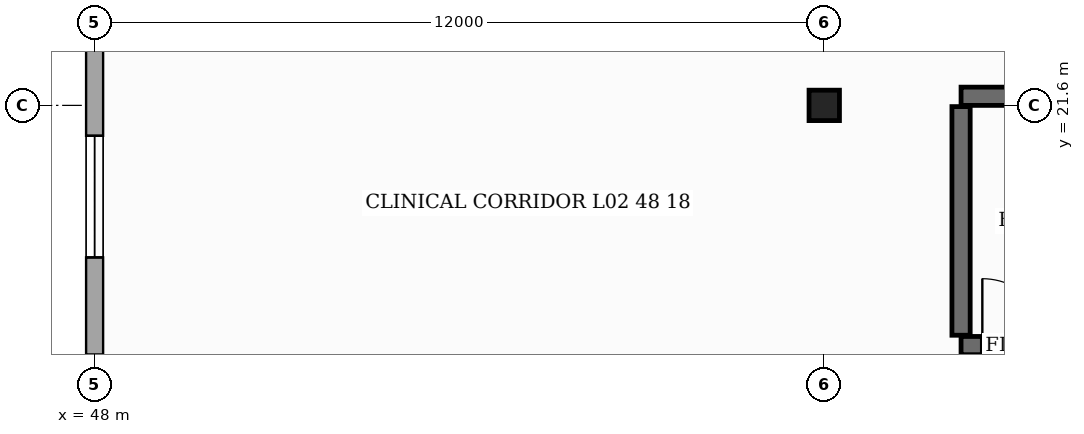
"""IFC4 building model, lengths in metres.
Left out: names, types, materials, properties, quantities, classifications, styles, units other than length and angle.
Written with IfcOpenShell. Run it as: python <this file> out.ifc"""

import sys

from ifc_helpers import new_model, si_unit, direction, frame, frame_2d, origin, origin_2d, place, context, subcontext, project, spatial, rectangle, extrude, element, fill, save


model = new_model("IFC4")
c1 = context("Model", 3, precision=1e-05, world=origin(), true_north=direction((0.0, 1.0)))
c2 = subcontext(c1, "Body", "Model", "MODEL_VIEW")
j1 = project(units=[si_unit("LENGTHUNIT", "METRE"), si_unit("PLANEANGLEUNIT", "RADIAN")], contexts=[c1])
p1 = place(None, origin())
s1 = spatial("IfcSite", under=j1, at=p1, CompositionType="ELEMENT")
p2 = place(p1, origin())
s2 = spatial("IfcBuilding", under=s1, at=p2, CompositionType="ELEMENT")
p3 = place(p2, frame((0.0, 0.0, 9.6)))
s3 = spatial("IfcBuildingStorey", under=s2, at=p3, CompositionType="ELEMENT", Elevation=9.6)
p4 = place(p3, frame((60.0, 21.6, 0.0), z_axis=(0.0, 0.0, 1.0), x_axis=(0.0, 1.0, 0.0)))
e1 = element("IfcColumn", 1, at=p4, inside=s3, PredefinedType="COLUMN", context=c2, shape_type="SweptSolid", body=[
    extrude(rectangle(XDim=0.5, YDim=0.5, at=origin_2d()), origin(), (0.0, 0.0, 1.0), 4.8),
])
p5 = place(p3, frame((62.25, 17.65, 0.0), z_axis=(0.0, 0.0, 1.0), x_axis=(1.0, 0.0, 0.0)))
e2 = element("IfcWall", 2, at=p5, inside=s3, PredefinedType="SHEAR", context=c2, shape_type="SweptSolid", body=[
    extrude(rectangle(XDim=8.7, YDim=0.3, at=frame_2d((4.35, 0.0))), origin(), (0.0, 0.0, 1.0), 4.8),
])
p6 = place(p5, frame((0.35, 0.0, 0.0)))
e3 = element("IfcOpeningElement", 3, at=p6, cuts=e2, PredefinedType="OPENING", context=c2, shape_type="SweptSolid", body=[
    extrude(rectangle(XDim=1.1, YDim=2.15, at=frame_2d((0.55, 1.075))), frame((0.0, 0.16, 0.0), z_axis=(0.0, -1.0, 0.0), x_axis=(1.0, 0.0, 0.0)), (0.0, 0.0, 1.0), 0.32),
])
p7 = place(p3, frame((70.95, 21.75, 0.0), z_axis=(0.0, 0.0, 1.0), x_axis=(-1.0, 0.0, 0.0)))
e4 = element("IfcWall", 4, at=p7, inside=s3, PredefinedType="SHEAR", context=c2, shape_type="SweptSolid", body=[
    extrude(rectangle(XDim=8.7, YDim=0.3, at=frame_2d((4.35, 0.0))), origin(), (0.0, 0.0, 1.0), 4.8),
])
p8 = place(p3, frame((62.25, 17.82, 0.0), z_axis=(0.0, 0.0, 1.0), x_axis=(0.0, 1.0, 0.0)))
e5 = element("IfcWall", 5, at=p8, inside=s3, PredefinedType="SHEAR", context=c2, shape_type="SweptSolid", body=[
    extrude(rectangle(XDim=3.76, YDim=0.3, at=frame_2d((1.88, 0.0))), origin(), (0.0, 0.0, 1.0), 4.8),
])
p9 = place(p3, frame((48.0, 0.0, 0.0), z_axis=(0.0, 0.0, 1.0), x_axis=(0.0, 1.0, 0.0)))
e6 = element("IfcWall", 6, at=p9, inside=s3, PredefinedType="STANDARD", context=c2, shape_type="SweptSolid", body=[
    extrude(rectangle(XDim=45.6, YDim=0.28, at=frame_2d((22.8, 0.0))), origin(), (0.0, 0.0, 1.0), 4.43),
])
p10 = place(p9, frame((1.1, 0.0, 1.05)))
e7 = element("IfcOpeningElement", 7, at=p10, cuts=e6, PredefinedType="OPENING", context=c2, shape_type="SweptSolid", body=[
    extrude(rectangle(XDim=2.0, YDim=2.1, at=frame_2d((1.0, 1.05))), frame((0.0, 0.15, 0.0), z_axis=(0.0, -1.0, 0.0), x_axis=(1.0, 0.0, 0.0)), (0.0, 0.0, 1.0), 0.3),
])
p11 = place(p9, frame((4.7, 0.0, 1.05)))
e8 = element("IfcOpeningElement", 8, at=p11, cuts=e6, PredefinedType="OPENING", context=c2, shape_type="SweptSolid", body=[
    extrude(rectangle(XDim=2.0, YDim=2.1, at=frame_2d((1.0, 1.05))), frame((0.0, 0.15, 0.0), z_axis=(0.0, -1.0, 0.0), x_axis=(1.0, 0.0, 0.0)), (0.0, 0.0, 1.0), 0.3),
])
p12 = place(p9, frame((8.3, 0.0, 1.05)))
e9 = element("IfcOpeningElement", 9, at=p12, cuts=e6, PredefinedType="OPENING", context=c2, shape_type="SweptSolid", body=[
    extrude(rectangle(XDim=2.0, YDim=2.1, at=frame_2d((1.0, 1.05))), frame((0.0, 0.15, 0.0), z_axis=(0.0, -1.0, 0.0), x_axis=(1.0, 0.0, 0.0)), (0.0, 0.0, 1.0), 0.3),
])
p13 = place(p9, frame((11.9, 0.0, 1.05)))
e10 = element("IfcOpeningElement", 10, at=p13, cuts=e6, PredefinedType="OPENING", context=c2, shape_type="SweptSolid", body=[
    extrude(rectangle(XDim=2.0, YDim=2.1, at=frame_2d((1.0, 1.05))), frame((0.0, 0.15, 0.0), z_axis=(0.0, -1.0, 0.0), x_axis=(1.0, 0.0, 0.0)), (0.0, 0.0, 1.0), 0.3),
])
p14 = place(p9, frame((15.5, 0.0, 1.05)))
e11 = element("IfcOpeningElement", 11, at=p14, cuts=e6, PredefinedType="OPENING", context=c2, shape_type="SweptSolid", body=[
    extrude(rectangle(XDim=2.0, YDim=2.1, at=frame_2d((1.0, 1.05))), frame((0.0, 0.15, 0.0), z_axis=(0.0, -1.0, 0.0), x_axis=(1.0, 0.0, 0.0)), (0.0, 0.0, 1.0), 0.3),
])
p15 = place(p9, frame((19.1, 0.0, 1.05)))
e12 = element("IfcOpeningElement", 12, at=p15, cuts=e6, PredefinedType="OPENING", context=c2, shape_type="SweptSolid", body=[
    extrude(rectangle(XDim=2.0, YDim=2.1, at=frame_2d((1.0, 1.05))), frame((0.0, 0.15, 0.0), z_axis=(0.0, -1.0, 0.0), x_axis=(1.0, 0.0, 0.0)), (0.0, 0.0, 1.0), 0.3),
])
p16 = place(p9, frame((22.7, 0.0, 1.05)))
e13 = element("IfcOpeningElement", 13, at=p16, cuts=e6, PredefinedType="OPENING", context=c2, shape_type="SweptSolid", body=[
    extrude(rectangle(XDim=2.0, YDim=2.1, at=frame_2d((1.0, 1.05))), frame((0.0, 0.15, 0.0), z_axis=(0.0, -1.0, 0.0), x_axis=(1.0, 0.0, 0.0)), (0.0, 0.0, 1.0), 0.3),
])
p17 = place(p9, frame((26.3, 0.0, 1.05)))
e14 = element("IfcOpeningElement", 14, at=p17, cuts=e6, PredefinedType="OPENING", context=c2, shape_type="SweptSolid", body=[
    extrude(rectangle(XDim=2.0, YDim=2.1, at=frame_2d((1.0, 1.05))), frame((0.0, 0.15, 0.0), z_axis=(0.0, -1.0, 0.0), x_axis=(1.0, 0.0, 0.0)), (0.0, 0.0, 1.0), 0.3),
])
p18 = place(p9, frame((29.9, 0.0, 1.05)))
e15 = element("IfcOpeningElement", 15, at=p18, cuts=e6, PredefinedType="OPENING", context=c2, shape_type="SweptSolid", body=[
    extrude(rectangle(XDim=2.0, YDim=2.1, at=frame_2d((1.0, 1.05))), frame((0.0, 0.15, 0.0), z_axis=(0.0, -1.0, 0.0), x_axis=(1.0, 0.0, 0.0)), (0.0, 0.0, 1.0), 0.3),
])
p19 = place(p9, frame((33.5, 0.0, 1.05)))
e16 = element("IfcOpeningElement", 16, at=p19, cuts=e6, PredefinedType="OPENING", context=c2, shape_type="SweptSolid", body=[
    extrude(rectangle(XDim=2.0, YDim=2.1, at=frame_2d((1.0, 1.05))), frame((0.0, 0.15, 0.0), z_axis=(0.0, -1.0, 0.0), x_axis=(1.0, 0.0, 0.0)), (0.0, 0.0, 1.0), 0.3),
])
p20 = place(p9, frame((37.1, 0.0, 1.05)))
e17 = element("IfcOpeningElement", 17, at=p20, cuts=e6, PredefinedType="OPENING", context=c2, shape_type="SweptSolid", body=[
    extrude(rectangle(XDim=2.0, YDim=2.1, at=frame_2d((1.0, 1.05))), frame((0.0, 0.15, 0.0), z_axis=(0.0, -1.0, 0.0), x_axis=(1.0, 0.0, 0.0)), (0.0, 0.0, 1.0), 0.3),
])
p21 = place(p9, frame((40.7, 0.0, 1.05)))
e18 = element("IfcOpeningElement", 18, at=p21, cuts=e6, PredefinedType="OPENING", context=c2, shape_type="SweptSolid", body=[
    extrude(rectangle(XDim=2.0, YDim=2.1, at=frame_2d((1.0, 1.05))), frame((0.0, 0.15, 0.0), z_axis=(0.0, -1.0, 0.0), x_axis=(1.0, 0.0, 0.0)), (0.0, 0.0, 1.0), 0.3),
])
p22 = place(p15, origin())
e19 = element("IfcWindow", 19, at=p22, inside=s3, PartitioningType="DOUBLE_PANEL_VERTICAL", PredefinedType="WINDOW", context=c2, shape_type="SweptSolid", body=[
    extrude(rectangle(XDim=2.0, YDim=2.1, at=frame_2d((1.0, 1.05))), frame((0.0, 0.03, 0.0), z_axis=(0.0, -1.0, 0.0), x_axis=(1.0, 0.0, 0.0)), (0.0, 0.0, 1.0), 0.06),
])
fill(e12, e19)
p23 = place(p6, origin())
e20 = element("IfcDoor", 20, at=p23, inside=s3, OperationType="SINGLE_SWING_LEFT", PredefinedType="DOOR", context=c2, shape_type="SweptSolid", body=[
    extrude(rectangle(XDim=1.1, YDim=2.15, at=frame_2d((0.55, 1.075))), frame((0.0, 0.025, 0.0), z_axis=(0.0, -1.0, 0.0), x_axis=(1.0, 0.0, 0.0)), (0.0, 0.0, 1.0), 0.05),
])
fill(e3, e20)
save(model, sys.argv[1])
